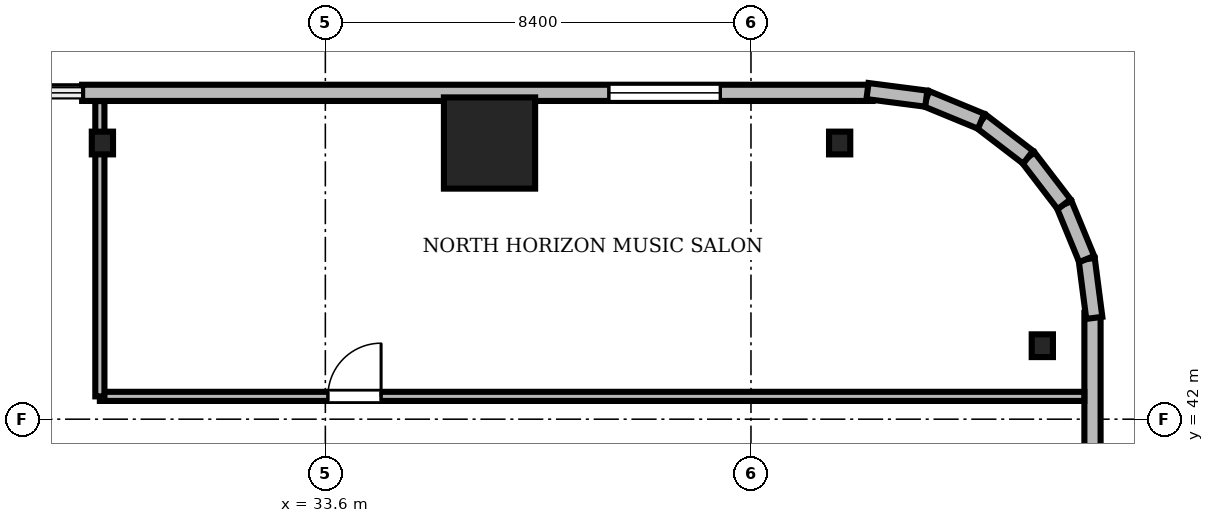
"""IFC4 building model, lengths in metres.
Left out: names, types, materials, properties, quantities, classifications, styles, units other than length and angle.
Written with IfcOpenShell. Run it as: python <this file> out.ifc"""

import sys

from ifc_helpers import new_model, si_unit, direction, frame, frame_2d, origin, origin_2d, place, context, subcontext, project, spatial, rectangle, i_section, extrude, source, transform, mapped, element, fill, save


model = new_model("IFC4")
c1 = context("Model", 3, precision=1e-05, world=origin(), true_north=direction((0.0, 1.0)))
c2 = subcontext(c1, "Body", "Model", "MODEL_VIEW")
j1 = project(units=[si_unit("LENGTHUNIT", "METRE"), si_unit("PLANEANGLEUNIT", "RADIAN")], contexts=[c1])
p1 = place(None, origin())
s1 = spatial("IfcSite", under=j1, at=p1, CompositionType="ELEMENT")
p2 = place(p1, origin())
s2 = spatial("IfcBuilding", under=s1, at=p2, CompositionType="ELEMENT")
p3 = place(p2, frame((0.0, 0.0, 75.05)))
s3 = spatial("IfcBuildingStorey", under=s2, at=p3, CompositionType="ELEMENT", Elevation=75.05)
m1 = source(origin(), c2, "Body", "SweptSolid", [
    extrude(rectangle(XDim=1.8, YDim=1.8, at=origin_2d()), origin(), (0.0, 0.0, 1.0), 3.41),
])
p4 = place(p3, frame((36.84, 47.45, 0.0), z_axis=(0.0, 0.0, 1.0), x_axis=(1.0, 0.0, 0.0)))
e1 = element("IfcColumn", 1, at=p4, inside=s3, PredefinedType="COLUMN", context=c2, shape_type="MappedRepresentation", body=[
    mapped(m1, transform((0.0, 0.0, 0.0), scale=1.0)),
])
m2 = source(origin(), c2, "Body", "SweptSolid", [
    extrude(i_section(OverallWidth=0.419, OverallDepth=0.449, WebThickness=0.031, FlangeThickness=0.048, FilletRadius=0.015, at=origin_2d()), origin(), (0.0, 0.0, 1.0), 3.41),
])
for number, where, z_axis, x_axis in (
    (2, (47.75, 43.45, 0.0), (0.0, 0.0, 1.0), (1.0, 0.0, 0.0)),
    (3, (43.75, 47.45, 0.0), (0.0, 0.0, 1.0), (1.0, 0.0, 0.0)),
    (4, (29.2, 47.45, 0.0), (0.0, 0.0, 1.0), (1.0, 0.0, 0.0)),
):
    element("IfcColumn", number, at=place(p3, frame(where, z_axis=z_axis, x_axis=x_axis)), inside=s3, PredefinedType="COLUMN", context=c2, shape_type="MappedRepresentation", body=[
        mapped(m2, transform((0.0, 0.0, 0.0), scale=1.0)),
    ])
m3 = source(origin(), c2, "Body", "SweptSolid", [
    extrude(rectangle(XDim=15.6, YDim=0.32, at=frame_2d((7.8, 0.0))), origin(), (0.0, 0.0, 1.0), 3.41),
])
p5 = place(p3, frame((44.4, 48.44, 0.0), z_axis=(0.0, 0.0, 1.0), x_axis=(-1.0, 0.0, 0.0)))
e5 = element("IfcWall", 5, at=p5, inside=s3, PredefinedType="SOLIDWALL", context=c2, shape_type="MappedRepresentation", body=[
    mapped(m3, transform((0.0, 0.0, 0.0), scale=1.0)),
])
m4 = source(origin(), c2, "Body", "SweptSolid", [
    extrude(rectangle(XDim=2.2, YDim=2.4, at=frame_2d((1.1, 1.2))), frame((0.0, 0.17, 0.0), z_axis=(0.0, -1.0, 0.0), x_axis=(1.0, 0.0, 0.0)), (0.0, 0.0, 1.0), 0.34),
])
p6 = place(p5, frame((3.005, 0.0, 0.72)))
e6 = element("IfcOpeningElement", 6, at=p6, cuts=e5, PredefinedType="OPENING", context=c2, shape_type="MappedRepresentation", body=[
    mapped(m4, transform((0.0, 0.0, 0.0), scale=1.0)),
])
m5 = source(origin(), c2, "Body", "SweptSolid", [
    extrude(rectangle(XDim=15.6, YDim=0.32, at=frame_2d((7.8, 0.0))), origin(), (0.0, 0.0, 1.0), 3.41),
])
p7 = place(p3, frame((48.74, 28.5, 0.0), z_axis=(0.0, 0.0, 1.0), x_axis=(0.0, 1.0, 0.0)))
e7 = element("IfcWall", 7, at=p7, inside=s3, PredefinedType="SOLIDWALL", context=c2, shape_type="MappedRepresentation", body=[
    mapped(m5, transform((0.0, 0.0, 0.0), scale=1.0)),
])
p8 = place(p7, frame((10.395, 0.0, 0.72)))
e8 = element("IfcOpeningElement", 8, at=p8, cuts=e7, PredefinedType="OPENING", context=c2, shape_type="MappedRepresentation", body=[
    mapped(m4, transform((0.0, 0.0, 0.0), scale=1.0)),
])
m6 = source(origin(), c2, "Body", "SweptSolid", [
    extrude(rectangle(XDim=1.17, YDim=0.32, at=frame_2d((0.585, 0.0))), origin(), (0.0, 0.0, 1.0), 3.41),
])
p9 = place(p3, frame((48.776, 44.0, 0.0), z_axis=(0.0, 0.0, 1.0), x_axis=(-0.128295670475, 0.991735963317, 0.0)))
e9 = element("IfcWall", 9, at=p9, inside=s3, PredefinedType="SOLIDWALL", context=c2, shape_type="MappedRepresentation", body=[
    mapped(m6, transform((0.0, 0.0, 0.0), scale=1.0)),
])
m7 = source(origin(), c2, "Body", "SweptSolid", [
    extrude(rectangle(XDim=1.169, YDim=0.32, at=frame_2d((0.584, 0.0))), origin(), (0.0, 0.0, 1.0), 3.41),
])
p10 = place(p3, frame((48.625, 45.16, 0.0), z_axis=(0.0, 0.0, 1.0), x_axis=(-0.381054331552, 0.924552646638, 0.0)))
e10 = element("IfcWall", 10, at=p10, inside=s3, PredefinedType="SOLIDWALL", context=c2, shape_type="MappedRepresentation", body=[
    mapped(m7, transform((0.0, 0.0, 0.0), scale=1.0)),
])
m8 = source(origin(), c2, "Body", "SweptSolid", [
    extrude(rectangle(XDim=1.169, YDim=0.32, at=frame_2d((0.584, 0.0))), origin(), (0.0, 0.0, 1.0), 3.41),
])
p11 = place(p3, frame((48.18, 46.241, 0.0), z_axis=(0.0, 0.0, 1.0), x_axis=(-0.608387696831, 0.793639975269, 0.0)))
e11 = element("IfcWall", 11, at=p11, inside=s3, PredefinedType="SOLIDWALL", context=c2, shape_type="MappedRepresentation", body=[
    mapped(m8, transform((0.0, 0.0, 0.0), scale=1.0)),
])
m9 = source(origin(), c2, "Body", "SweptSolid", [
    extrude(rectangle(XDim=1.169, YDim=0.32, at=frame_2d((0.584, 0.0))), origin(), (0.0, 0.0, 1.0), 3.41),
])
p12 = place(p3, frame((47.469, 47.169, 0.0), z_axis=(0.0, 0.0, 1.0), x_axis=(-0.793663520347, 0.608356981114, 0.0)))
e12 = element("IfcWall", 12, at=p12, inside=s3, PredefinedType="SOLIDWALL", context=c2, shape_type="MappedRepresentation", body=[
    mapped(m9, transform((0.0, 0.0, 0.0), scale=1.0)),
])
p13 = place(p3, frame((46.541, 47.88, 0.0), z_axis=(0.0, 0.0, 1.0), x_axis=(-0.924552646638, 0.381054331552, 0.0)))
e13 = element("IfcWall", 13, at=p13, inside=s3, PredefinedType="SOLIDWALL", context=c2, shape_type="MappedRepresentation", body=[
    mapped(m7, transform((0.0, 0.0, 0.0), scale=1.0)),
])
p14 = place(p3, frame((45.46, 48.325, 0.0), z_axis=(0.0, 0.0, 1.0), x_axis=(-0.991735963317, 0.128295670475, 0.0)))
e14 = element("IfcWall", 14, at=p14, inside=s3, PredefinedType="SOLIDWALL", context=c2, shape_type="MappedRepresentation", body=[
    mapped(m6, transform((0.0, 0.0, 0.0), scale=1.0)),
])
m10 = source(origin(), c2, "Body", "SweptSolid", [
    extrude(rectangle(XDim=19.428, YDim=0.18, at=frame_2d((9.714, 0.0))), origin(), (0.0, 0.0, 1.0), 2.652),
])
p15 = place(p3, frame((29.15, 42.45, 0.0), z_axis=(0.0, 0.0, 1.0), x_axis=(1.0, 0.0, 0.0)))
e15 = element("IfcWall", 15, at=p15, inside=s3, PredefinedType="PARTITIONING", context=c2, shape_type="MappedRepresentation", body=[
    mapped(m10, transform((0.0, 0.0, 0.0), scale=1.0)),
])
m11 = source(origin(), c2, "Body", "SweptSolid", [
    extrude(rectangle(XDim=1.05, YDim=2.2, at=frame_2d((0.525, 1.1))), frame((0.0, 0.1, 0.0), z_axis=(0.0, -1.0, 0.0), x_axis=(1.0, 0.0, 0.0)), (0.0, 0.0, 1.0), 0.2),
])
p16 = place(p15, frame((4.5, 0.0, 0.0)))
e16 = element("IfcOpeningElement", 16, at=p16, cuts=e15, PredefinedType="OPENING", context=c2, shape_type="MappedRepresentation", body=[
    mapped(m11, transform((0.0, 0.0, 0.0), scale=1.0)),
])
m12 = source(origin(), c2, "Body", "SweptSolid", [
    extrude(rectangle(XDim=5.828, YDim=0.18, at=frame_2d((2.914, 0.0))), origin(), (0.0, 0.0, 1.0), 2.652),
])
p17 = place(p3, frame((29.15, 42.45, 0.0), z_axis=(0.0, 0.0, 1.0), x_axis=(0.0, 1.0, 0.0)))
e17 = element("IfcWall", 17, at=p17, inside=s3, PredefinedType="PARTITIONING", context=c2, shape_type="MappedRepresentation", body=[
    mapped(m12, transform((0.0, 0.0, 0.0), scale=1.0)),
])
m13 = source(origin(), c2, "Body", "SweptSolid", [
    extrude(rectangle(XDim=2.2, YDim=2.4, at=frame_2d((1.1, 1.2))), frame((0.0, 0.03, 0.0), z_axis=(0.0, -1.0, 0.0), x_axis=(1.0, 0.0, 0.0)), (0.0, 0.0, 1.0), 0.06),
])
p18 = place(p6, origin())
e18 = element("IfcWindow", 18, at=p18, inside=s3, PartitioningType="SINGLE_PANEL", PredefinedType="WINDOW", context=c2, shape_type="MappedRepresentation", body=[
    mapped(m13, transform((0.0, 0.0, 0.0), scale=1.0)),
])
fill(e6, e18)
m14 = source(origin(), c2, "Body", "SweptSolid", [
    extrude(rectangle(XDim=1.05, YDim=2.2, at=frame_2d((0.525, 1.1))), frame((0.0, 0.025, 0.0), z_axis=(0.0, -1.0, 0.0), x_axis=(1.0, 0.0, 0.0)), (0.0, 0.0, 1.0), 0.05),
])
p19 = place(p16, origin())
e19 = element("IfcDoor", 19, at=p19, inside=s3, OperationType="SINGLE_SWING_RIGHT", PredefinedType="DOOR", context=c2, shape_type="MappedRepresentation", body=[
    mapped(m14, transform((0.0, 0.0, 0.0), scale=1.0)),
])
fill(e16, e19)
save(model, sys.argv[1])
